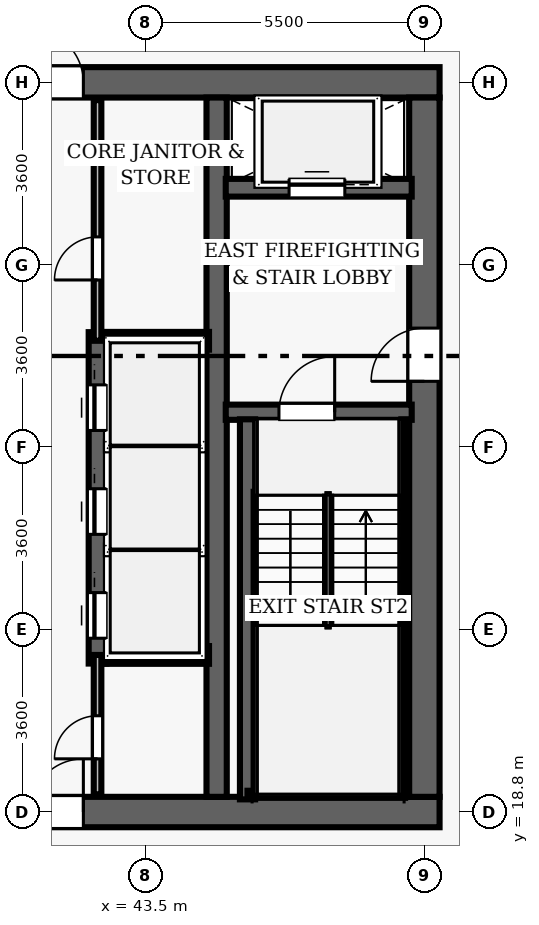
"""IFC4 building model, lengths in metres.
Left out: names, types, materials, properties, quantities, classifications, styles, units other than length and angle.
Written with IfcOpenShell. Run it as: python <this file> out.ifc"""

import sys

from ifc_helpers import new_model, si_unit, direction, frame, frame_2d, origin, place, context, subcontext, project, spatial, rectangle, extrude, element, fill, save


model = new_model("IFC4")
c1 = context("Model", 3, precision=1e-05, world=origin(), true_north=direction((0.0, 1.0)))
c2 = subcontext(c1, "Body", "Model", "MODEL_VIEW")
j1 = project(units=[si_unit("LENGTHUNIT", "METRE"), si_unit("PLANEANGLEUNIT", "RADIAN")], contexts=[c1])
p1 = place(None, origin())
s1 = spatial("IfcSite", under=j1, at=p1, CompositionType="ELEMENT")
p2 = place(p1, origin())
s2 = spatial("IfcBuilding", under=s1, at=p2, CompositionType="ELEMENT")
p3 = place(p2, origin())
s3 = spatial("IfcBuildingStorey", under=s2, at=p3, CompositionType="ELEMENT", Elevation=0.0)
p4 = place(p3, frame((26.7, 18.8, 0.0), z_axis=(0.0, 0.0, 1.0), x_axis=(1.0, 0.0, 0.0)))
e1 = element("IfcWall", 1, at=p4, inside=s3, PredefinedType="SHEAR", context=c2, shape_type="SweptSolid", body=[
    extrude(rectangle(XDim=22.6, YDim=0.6, at=frame_2d((11.3, 0.0))), origin(), (0.0, 0.0, 1.0), 6.6),
])
p5 = place(p4, frame((14.52, 0.0, 0.0)))
e2 = element("IfcOpeningElement", 2, at=p5, cuts=e1, PredefinedType="OPENING", context=c2, shape_type="SweptSolid", body=[
    extrude(rectangle(XDim=1.05, YDim=2.15, at=frame_2d((0.525, 1.075))), frame((0.0, 0.31, 0.0), z_axis=(0.0, -1.0, 0.0), x_axis=(1.0, 0.0, 0.0)), (0.0, 0.0, 1.0), 0.62),
])
p6 = place(p3, frame((26.7, 33.2, 0.0), z_axis=(0.0, 0.0, 1.0), x_axis=(1.0, 0.0, 0.0)))
e3 = element("IfcWall", 3, at=p6, inside=s3, PredefinedType="SHEAR", context=c2, shape_type="SweptSolid", body=[
    extrude(rectangle(XDim=22.6, YDim=0.6, at=frame_2d((11.3, 0.0))), origin(), (0.0, 0.0, 1.0), 6.6),
])
p7 = place(p6, frame((4.62, 0.0, 0.0)))
e4 = element("IfcOpeningElement", 4, at=p7, cuts=e3, PredefinedType="OPENING", context=c2, shape_type="SweptSolid", body=[
    extrude(rectangle(XDim=1.05, YDim=2.15, at=frame_2d((0.525, 1.075))), frame((0.0, 0.31, 0.0), z_axis=(0.0, -1.0, 0.0), x_axis=(1.0, 0.0, 0.0)), (0.0, 0.0, 1.0), 0.62),
])
p8 = place(p6, frame((14.52, 0.0, 0.0)))
e5 = element("IfcOpeningElement", 5, at=p8, cuts=e3, PredefinedType="OPENING", context=c2, shape_type="SweptSolid", body=[
    extrude(rectangle(XDim=1.05, YDim=2.15, at=frame_2d((0.525, 1.075))), frame((0.0, 0.31, 0.0), z_axis=(0.0, -1.0, 0.0), x_axis=(1.0, 0.0, 0.0)), (0.0, 0.0, 1.0), 0.62),
])
p9 = place(p3, frame((49.0, 19.1, 0.0), z_axis=(0.0, 0.0, 1.0), x_axis=(0.0, 1.0, 0.0)))
e6 = element("IfcWall", 6, at=p9, inside=s3, PredefinedType="SHEAR", context=c2, shape_type="SweptSolid", body=[
    extrude(rectangle(XDim=13.8, YDim=0.6, at=frame_2d((6.9, 0.0))), origin(), (0.0, 0.0, 1.0), 6.6),
])
p10 = place(p9, frame((8.2, 0.0, 0.0)))
e7 = element("IfcOpeningElement", 7, at=p10, cuts=e6, PredefinedType="OPENING", context=c2, shape_type="SweptSolid", body=[
    extrude(rectangle(XDim=1.05, YDim=2.15, at=frame_2d((0.525, 1.075))), frame((0.0, 0.31, 0.0), z_axis=(0.0, -1.0, 0.0), x_axis=(1.0, 0.0, 0.0)), (0.0, 0.0, 1.0), 0.62),
])
p11 = place(p3, frame((44.9, 19.1, 0.0), z_axis=(0.0, 0.0, 1.0), x_axis=(0.0, 1.0, 0.0)))
e8 = element("IfcWall", 8, at=p11, inside=s3, PredefinedType="SHEAR", context=c2, shape_type="SweptSolid", body=[
    extrude(rectangle(XDim=13.8, YDim=0.4, at=frame_2d((6.9, 0.0))), origin(), (0.0, 0.0, 1.0), 6.6),
])
p12 = place(p3, frame((45.08, 26.69, 0.0), z_axis=(0.0, 0.0, 1.0), x_axis=(1.0, 0.0, 0.0)))
e9 = element("IfcWall", 9, at=p12, inside=s3, PredefinedType="SHEAR", context=c2, shape_type="SweptSolid", body=[
    extrude(rectangle(XDim=3.67, YDim=0.3, at=frame_2d((1.835, 0.0))), origin(), (0.0, 0.0, 1.0), 6.6),
])
p13 = place(p12, frame((1.05, 0.0, 0.0)))
e10 = element("IfcOpeningElement", 10, at=p13, cuts=e9, PredefinedType="OPENING", context=c2, shape_type="SweptSolid", body=[
    extrude(rectangle(XDim=1.1, YDim=2.15, at=frame_2d((0.55, 1.075))), frame((0.0, 0.16, 0.0), z_axis=(0.0, -1.0, 0.0), x_axis=(1.0, 0.0, 0.0)), (0.0, 0.0, 1.0), 0.32),
])
p14 = place(p3, frame((45.51, 19.05, 0.0), z_axis=(0.0, 0.0, 1.0), x_axis=(0.0, 1.0, 0.0)))
e11 = element("IfcWall", 11, at=p14, inside=s3, PredefinedType="SHEAR", context=c2, shape_type="SweptSolid", body=[
    extrude(rectangle(XDim=7.5, YDim=0.3, at=frame_2d((3.75, 0.0))), origin(), (0.0, 0.0, 1.0), 6.6),
])
p15 = place(p3, frame((48.605, 19.1, 0.0), z_axis=(0.0, 0.0, 1.0), x_axis=(0.0, 1.0, 0.0)))
e12 = element("IfcWall", 12, at=p15, inside=s3, PredefinedType="SHEAR", context=c2, shape_type="SweptSolid", body=[
    extrude(rectangle(XDim=7.45, YDim=0.12, at=frame_2d((3.725, 0.0))), origin(), (0.0, 0.0, 1.0), 6.6),
])
p16 = place(p3, frame((45.51, 19.16, 0.0), z_axis=(0.0, 0.0, 1.0), x_axis=(1.0, 0.0, 0.0)))
e13 = element("IfcWall", 13, at=p16, inside=s3, PredefinedType="SHEAR", context=c2, shape_type="SweptSolid", body=[
    extrude(rectangle(XDim=3.095, YDim=0.12, at=frame_2d((1.547, 0.0))), origin(), (0.0, 0.0, 1.0), 6.6),
])
p17 = place(p3, frame((45.08, 31.12, 0.0), z_axis=(0.0, 0.0, 1.0), x_axis=(1.0, 0.0, 0.0)))
e14 = element("IfcWall", 14, at=p17, inside=s3, PredefinedType="SHEAR", context=c2, shape_type="SweptSolid", body=[
    extrude(rectangle(XDim=3.67, YDim=0.35, at=frame_2d((1.835, 0.0))), origin(), (0.0, 0.0, 1.0), 5.31),
])
p18 = place(p17, frame((1.25, 0.0, 0.0)))
e15 = element("IfcOpeningElement", 15, at=p18, cuts=e14, PredefinedType="OPENING", context=c2, shape_type="SweptSolid", body=[
    extrude(rectangle(XDim=1.1, YDim=2.15, at=frame_2d((0.55, 1.075))), frame((0.0, 0.185, 0.0), z_axis=(0.0, -1.0, 0.0), x_axis=(1.0, 0.0, 0.0)), (0.0, 0.0, 1.0), 0.37),
])
p19 = place(p3, frame((42.55, 21.73, 0.0), z_axis=(0.0, 0.0, 1.0), x_axis=(0.0, 1.0, 0.0)))
e16 = element("IfcWall", 16, at=p19, inside=s3, PredefinedType="SHEAR", context=c2, shape_type="SweptSolid", body=[
    extrude(rectangle(XDim=6.54, YDim=0.35, at=frame_2d((3.27, 0.0))), origin(), (0.0, 0.0, 1.0), 5.31),
])
p20 = place(p19, frame((0.5, 0.0, 0.0)))
e17 = element("IfcOpeningElement", 17, at=p20, cuts=e16, PredefinedType="OPENING", context=c2, shape_type="SweptSolid", body=[
    extrude(rectangle(XDim=0.9, YDim=2.15, at=frame_2d((0.45, 1.075))), frame((0.0, 0.185, 0.0), z_axis=(0.0, -1.0, 0.0), x_axis=(1.0, 0.0, 0.0)), (0.0, 0.0, 1.0), 0.37),
])
p21 = place(p19, frame((2.55, 0.0, 0.0)))
e18 = element("IfcOpeningElement", 18, at=p21, cuts=e16, PredefinedType="OPENING", context=c2, shape_type="SweptSolid", body=[
    extrude(rectangle(XDim=0.9, YDim=2.15, at=frame_2d((0.45, 1.075))), frame((0.0, 0.185, 0.0), z_axis=(0.0, -1.0, 0.0), x_axis=(1.0, 0.0, 0.0)), (0.0, 0.0, 1.0), 0.37),
])
p22 = place(p19, frame((4.6, 0.0, 0.0)))
e19 = element("IfcOpeningElement", 19, at=p22, cuts=e16, PredefinedType="OPENING", context=c2, shape_type="SweptSolid", body=[
    extrude(rectangle(XDim=0.9, YDim=2.15, at=frame_2d((0.45, 1.075))), frame((0.0, 0.185, 0.0), z_axis=(0.0, -1.0, 0.0), x_axis=(1.0, 0.0, 0.0)), (0.0, 0.0, 1.0), 0.37),
])
for number, where, z_axis, x_axis in (
    (20, (42.72, 21.9, 0.0), (0.0, 0.0, 1.0), (1.0, 0.0, 0.0)),
    (21, (42.72, 28.1, 0.0), (0.0, 0.0, 1.0), (1.0, 0.0, 0.0)),
):
    element("IfcWall", number, at=place(p3, frame(where, z_axis=z_axis, x_axis=x_axis)), inside=s3, PredefinedType="SHEAR", context=c2, shape_type="SweptSolid", body=[
        extrude(rectangle(XDim=2.03, YDim=0.35, at=frame_2d((1.015, 0.0))), origin(), (0.0, 0.0, 1.0), 5.31),
    ])
p23 = place(p3, frame((42.55, 28.1, 0.0), z_axis=(0.0, 0.0, 1.0), x_axis=(0.0, 1.0, 0.0)))
e22 = element("IfcWall", 22, at=p23, inside=s3, PredefinedType="PARTITIONING", context=c2, shape_type="SweptSolid", body=[
    extrude(rectangle(XDim=4.75, YDim=0.15, at=frame_2d((2.375, 0.0))), origin(), (0.0, 0.0, 1.0), 5.31),
])
p24 = place(p23, frame((1.2, 0.0, 0.0)))
e23 = element("IfcOpeningElement", 23, at=p24, cuts=e22, PredefinedType="OPENING", context=c2, shape_type="SweptSolid", body=[
    extrude(rectangle(XDim=0.85, YDim=2.1, at=frame_2d((0.425, 1.05))), frame((0.0, 0.085, 0.0), z_axis=(0.0, -1.0, 0.0), x_axis=(1.0, 0.0, 0.0)), (0.0, 0.0, 1.0), 0.17),
])
p25 = place(p3, frame((42.55, 19.15, 0.0), z_axis=(0.0, 0.0, 1.0), x_axis=(0.0, 1.0, 0.0)))
e24 = element("IfcWall", 24, at=p25, inside=s3, PredefinedType="PARTITIONING", context=c2, shape_type="SweptSolid", body=[
    extrude(rectangle(XDim=2.75, YDim=0.15, at=frame_2d((1.375, 0.0))), origin(), (0.0, 0.0, 1.0), 5.31),
])
p26 = place(p25, frame((0.7, 0.0, 0.0)))
e25 = element("IfcOpeningElement", 25, at=p26, cuts=e24, PredefinedType="OPENING", context=c2, shape_type="SweptSolid", body=[
    extrude(rectangle(XDim=0.85, YDim=2.1, at=frame_2d((0.425, 1.05))), frame((0.0, 0.085, 0.0), z_axis=(0.0, -1.0, 0.0), x_axis=(1.0, 0.0, 0.0)), (0.0, 0.0, 1.0), 0.17),
])
p27 = place(p13, origin())
e26 = element("IfcDoor", 26, at=p27, inside=s3, OperationType="SINGLE_SWING_RIGHT", PredefinedType="DOOR", context=c2, shape_type="SweptSolid", body=[
    extrude(rectangle(XDim=1.1, YDim=2.15, at=frame_2d((0.55, 1.075))), frame((0.0, 0.025, 0.0), z_axis=(0.0, -1.0, 0.0), x_axis=(1.0, 0.0, 0.0)), (0.0, 0.0, 1.0), 0.05),
])
fill(e10, e26)
p28 = place(p10, origin())
e27 = element("IfcDoor", 27, at=p28, inside=s3, OperationType="SINGLE_SWING_LEFT", PredefinedType="DOOR", context=c2, shape_type="SweptSolid", body=[
    extrude(rectangle(XDim=1.05, YDim=2.15, at=frame_2d((0.525, 1.075))), frame((0.0, 0.025, 0.0), z_axis=(0.0, -1.0, 0.0), x_axis=(1.0, 0.0, 0.0)), (0.0, 0.0, 1.0), 0.05),
])
fill(e7, e27)
p29 = place(p8, origin())
e28 = element("IfcDoor", 28, at=p29, inside=s3, OperationType="SINGLE_SWING_LEFT", PredefinedType="DOOR", context=c2, shape_type="SweptSolid", body=[
    extrude(rectangle(XDim=1.05, YDim=2.15, at=frame_2d((0.525, 1.075))), frame((0.0, 0.025, 0.0), z_axis=(0.0, -1.0, 0.0), x_axis=(1.0, 0.0, 0.0)), (0.0, 0.0, 1.0), 0.05),
])
fill(e5, e28)
p30 = place(p5, origin())
e29 = element("IfcDoor", 29, at=p30, inside=s3, OperationType="SINGLE_SWING_RIGHT", PredefinedType="DOOR", context=c2, shape_type="SweptSolid", body=[
    extrude(rectangle(XDim=1.05, YDim=2.15, at=frame_2d((0.525, 1.075))), frame((0.0, 0.025, 0.0), z_axis=(0.0, -1.0, 0.0), x_axis=(1.0, 0.0, 0.0)), (0.0, 0.0, 1.0), 0.05),
])
fill(e2, e29)
p31 = place(p24, origin())
e30 = element("IfcDoor", 30, at=p31, inside=s3, OperationType="SINGLE_SWING_LEFT", PredefinedType="DOOR", context=c2, shape_type="SweptSolid", body=[
    extrude(rectangle(XDim=0.85, YDim=2.1, at=frame_2d((0.425, 1.05))), frame((0.0, 0.025, 0.0), z_axis=(0.0, -1.0, 0.0), x_axis=(1.0, 0.0, 0.0)), (0.0, 0.0, 1.0), 0.05),
])
fill(e23, e30)
p32 = place(p26, origin())
e31 = element("IfcDoor", 31, at=p32, inside=s3, OperationType="SINGLE_SWING_LEFT", PredefinedType="DOOR", context=c2, shape_type="SweptSolid", body=[
    extrude(rectangle(XDim=0.85, YDim=2.1, at=frame_2d((0.425, 1.05))), frame((0.0, 0.025, 0.0), z_axis=(0.0, -1.0, 0.0), x_axis=(1.0, 0.0, 0.0)), (0.0, 0.0, 1.0), 0.05),
])
fill(e25, e31)
p33 = place(p20, origin())
e32 = element("IfcDoor", 32, at=p33, inside=s3, OperationType="SLIDING_TO_LEFT", PredefinedType="DOOR", context=c2, shape_type="SweptSolid", body=[
    extrude(rectangle(XDim=0.9, YDim=2.15, at=frame_2d((0.45, 1.075))), frame((0.0, 0.025, 0.0), z_axis=(0.0, -1.0, 0.0), x_axis=(1.0, 0.0, 0.0)), (0.0, 0.0, 1.0), 0.05),
])
fill(e17, e32)
p34 = place(p21, origin())
e33 = element("IfcDoor", 33, at=p34, inside=s3, OperationType="SLIDING_TO_LEFT", PredefinedType="DOOR", context=c2, shape_type="SweptSolid", body=[
    extrude(rectangle(XDim=0.9, YDim=2.15, at=frame_2d((0.45, 1.075))), frame((0.0, 0.025, 0.0), z_axis=(0.0, -1.0, 0.0), x_axis=(1.0, 0.0, 0.0)), (0.0, 0.0, 1.0), 0.05),
])
fill(e18, e33)
p35 = place(p22, origin())
e34 = element("IfcDoor", 34, at=p35, inside=s3, OperationType="SLIDING_TO_LEFT", PredefinedType="DOOR", context=c2, shape_type="SweptSolid", body=[
    extrude(rectangle(XDim=0.9, YDim=2.15, at=frame_2d((0.45, 1.075))), frame((0.0, 0.025, 0.0), z_axis=(0.0, -1.0, 0.0), x_axis=(1.0, 0.0, 0.0)), (0.0, 0.0, 1.0), 0.05),
])
fill(e19, e34)
p36 = place(p18, origin())
e35 = element("IfcDoor", 35, at=p36, inside=s3, OperationType="SLIDING_TO_LEFT", PredefinedType="DOOR", context=c2, shape_type="SweptSolid", body=[
    extrude(rectangle(XDim=1.1, YDim=2.15, at=frame_2d((0.55, 1.075))), frame((0.0, 0.025, 0.0), z_axis=(0.0, -1.0, 0.0), x_axis=(1.0, 0.0, 0.0)), (0.0, 0.0, 1.0), 0.05),
])
fill(e15, e35)
save(model, sys.argv[1])
